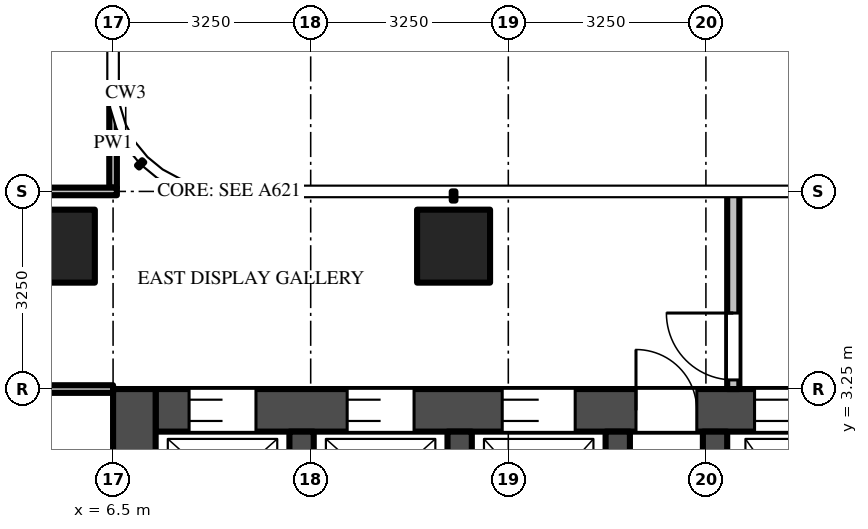
"""IFC4 building model, lengths in metres.
Left out: names, types, materials, properties, quantities, classifications, styles, units other than length and angle.
Written with IfcOpenShell. Run it as: python <this file> out.ifc"""

import sys

from ifc_helpers import new_model, si_unit, direction, frame, frame_2d, origin, origin_2d, place, context, subcontext, project, spatial, rectangle, extrude, source, transform, mapped, element, fill, save


model = new_model("IFC4")
c1 = context("Model", 3, precision=1e-05, world=origin(), true_north=direction((0.0, 1.0)))
c2 = subcontext(c1, "Body", "Model", "MODEL_VIEW")
j1 = project(units=[si_unit("LENGTHUNIT", "METRE"), si_unit("PLANEANGLEUNIT", "RADIAN")], contexts=[c1])
p1 = place(None, origin())
s1 = spatial("IfcSite", under=j1, at=p1, CompositionType="ELEMENT")
p2 = place(p1, origin())
s2 = spatial("IfcBuilding", under=s1, at=p2, CompositionType="ELEMENT")
p3 = place(p2, frame((0.0, 0.0, 181.5)))
s3 = spatial("IfcBuildingStorey", under=s2, at=p3, CompositionType="ELEMENT", Elevation=181.5)
m1 = source(origin(), c2, "Body", "SweptSolid", [
    extrude(rectangle(XDim=1.2, YDim=1.2, at=origin_2d()), origin(), (0.0, 0.0, 1.0), 3.9),
])
for number, where, z_axis, x_axis in (
    (1, (12.1, 5.6, 0.0), (0.0, 0.0, 1.0), (1.0, 0.0, 0.0)),
    (2, (5.6, 5.6, 0.0), (0.0, 0.0, 1.0), (1.0, 0.0, 0.0)),
):
    element("IfcColumn", number, at=place(p3, frame(where, z_axis=z_axis, x_axis=x_axis)), inside=s3, PredefinedType="COLUMN", context=c2, shape_type="MappedRepresentation", body=[
        mapped(m1, transform((0.0, 0.0, 0.0))),
    ])
m2 = source(origin(), c2, "Body", "SweptSolid", [
    extrude(rectangle(XDim=14.85, YDim=0.7, at=frame_2d((7.425, 0.0))), origin(), (0.0, 0.0, 1.0), 3.7),
])
p4 = place(p3, frame((7.2, 2.9, 0.0), z_axis=(0.0, 0.0, 1.0), x_axis=(1.0, 0.0, 0.0)))
e3 = element("IfcWall", 3, at=p4, inside=s3, PredefinedType="SHEAR", context=c2, shape_type="MappedRepresentation", body=[
    mapped(m2, transform((0.0, 0.0, 0.0))),
])
m3 = source(origin(), c2, "Body", "SweptSolid", [
    extrude(rectangle(XDim=1.1, YDim=2.1, at=frame_2d((0.55, 1.05))), frame((0.0, 0.36, 0.0), z_axis=(0.0, -1.0, 0.0), x_axis=(1.0, 0.0, 0.0)), (0.0, 0.0, 1.0), 0.72),
])
p5 = place(p4, frame((0.55, 0.0, 0.0)))
e4 = element("IfcOpeningElement", 4, at=p5, cuts=e3, PredefinedType="OPENING", context=c2, shape_type="MappedRepresentation", body=[
    mapped(m3, transform((0.0, 0.0, 0.0))),
])
p6 = place(p4, frame((3.15, 0.0, 0.0)))
e5 = element("IfcOpeningElement", 5, at=p6, cuts=e3, PredefinedType="OPENING", context=c2, shape_type="MappedRepresentation", body=[
    mapped(m3, transform((0.0, 0.0, 0.0))),
])
m4 = source(origin(), c2, "Body", "SweptSolid", [
    extrude(rectangle(XDim=1.2, YDim=2.1, at=frame_2d((0.6, 1.05))), frame((0.0, 0.36, 0.0), z_axis=(0.0, -1.0, 0.0), x_axis=(1.0, 0.0, 0.0)), (0.0, 0.0, 1.0), 0.72),
])
p7 = place(p4, frame((5.7, 0.0, 0.0)))
e6 = element("IfcOpeningElement", 6, at=p7, cuts=e3, PredefinedType="OPENING", context=c2, shape_type="MappedRepresentation", body=[
    mapped(m4, transform((0.0, 0.0, 0.0))),
])
m5 = source(origin(), c2, "Body", "SweptSolid", [
    extrude(rectangle(XDim=1.3, YDim=2.1, at=frame_2d((0.65, 1.05))), frame((0.0, 0.36, 0.0), z_axis=(0.0, -1.0, 0.0), x_axis=(1.0, 0.0, 0.0)), (0.0, 0.0, 1.0), 0.72),
])
p8 = place(p4, frame((12.2, 0.0, 0.0)))
e7 = element("IfcOpeningElement", 7, at=p8, cuts=e3, PredefinedType="OPENING", context=c2, shape_type="MappedRepresentation", body=[
    mapped(m5, transform((0.0, 0.0, 0.0))),
])
p9 = place(p4, frame((9.85, 0.0, 0.0)))
e8 = element("IfcOpeningElement", 8, at=p9, cuts=e3, PredefinedType="OPENING", context=c2, shape_type="MappedRepresentation", body=[
    mapped(m4, transform((0.0, 0.0, 0.0))),
])
m6 = source(origin(), c2, "Body", "SweptSolid", [
    extrude(rectangle(XDim=1.0, YDim=2.1, at=frame_2d((0.5, 1.05))), frame((0.0, 0.36, 0.0), z_axis=(0.0, -1.0, 0.0), x_axis=(1.0, 0.0, 0.0)), (0.0, 0.0, 1.0), 0.72),
])
p10 = place(p4, frame((7.9, 0.0, 0.0)))
e9 = element("IfcOpeningElement", 9, at=p10, cuts=e3, PredefinedType="OPENING", context=c2, shape_type="MappedRepresentation", body=[
    mapped(m6, transform((0.0, 0.0, 0.0))),
])
m7 = source(origin(), c2, "Body", "SweptSolid", [
    extrude(rectangle(XDim=9.05, YDim=0.7, at=frame_2d((4.525, 0.0))), origin(), (0.0, 0.0, 1.0), 3.7),
])
p11 = place(p3, frame((6.85, -5.8, 0.0), z_axis=(0.0, 0.0, 1.0), x_axis=(0.0, 1.0, 0.0)))
e10 = element("IfcWall", 10, at=p11, inside=s3, PredefinedType="SHEAR", context=c2, shape_type="MappedRepresentation", body=[
    mapped(m7, transform((0.0, 0.0, 0.0))),
])
m8 = source(origin(), c2, "Body", "SweptSolid", [
    extrude(rectangle(XDim=1.8, YDim=2.1, at=frame_2d((0.9, 1.05))), frame((0.0, 0.36, 0.0), z_axis=(0.0, -1.0, 0.0), x_axis=(1.0, 0.0, 0.0)), (0.0, 0.0, 1.0), 0.72),
])
p12 = place(p11, frame((3.15, 0.0, 0.0)))
e11 = element("IfcOpeningElement", 11, at=p12, cuts=e10, PredefinedType="OPENING", context=c2, shape_type="MappedRepresentation", body=[
    mapped(m8, transform((0.0, 0.0, 0.0))),
])
m9 = source(origin(), c2, "Body", "SweptSolid", [
    extrude(rectangle(XDim=2.45, YDim=0.4, at=frame_2d((1.225, 0.0))), origin(), (0.0, 0.0, 1.0), 3.7),
])
for number, where, z_axis, x_axis in (
    (12, (9.6, 0.1, 0.0), (0.0, 0.0, 1.0), (0.0, 1.0, 0.0)),
    (13, (12.2, 0.1, 0.0), (0.0, 0.0, 1.0), (0.0, 1.0, 0.0)),
    (14, (14.8, 0.1, 0.0), (0.0, 0.0, 1.0), (0.0, 1.0, 0.0)),
    (15, (16.4, 0.1, 0.0), (0.0, 0.0, 1.0), (0.0, 1.0, 0.0)),
):
    element("IfcWall", number, at=place(p3, frame(where, z_axis=z_axis, x_axis=x_axis)), inside=s3, PredefinedType="SHEAR", context=c2, shape_type="MappedRepresentation", body=[
        mapped(m9, transform((0.0, 0.0, 0.0))),
    ])
m10 = source(origin(), c2, "Body", "SweptSolid", [
    extrude(rectangle(XDim=3.25, YDim=0.2, at=frame_2d((1.625, 0.0))), origin(), (0.0, 0.0, 1.0), 3.7),
])
p13 = place(p3, frame((16.7, 3.25, 0.0), z_axis=(0.0, 0.0, 1.0), x_axis=(0.0, 1.0, 0.0)))
e16 = element("IfcWall", 16, at=p13, inside=s3, PredefinedType="PARTITIONING", context=c2, shape_type="MappedRepresentation", body=[
    mapped(m10, transform((0.0, 0.0, 0.0))),
])
m11 = source(origin(), c2, "Body", "SweptSolid", [
    extrude(rectangle(XDim=1.1, YDim=2.1, at=frame_2d((0.55, 1.05))), frame((0.0, 0.11, 0.0), z_axis=(0.0, -1.0, 0.0), x_axis=(1.0, 0.0, 0.0)), (0.0, 0.0, 1.0), 0.22),
])
p14 = place(p13, frame((0.15, 0.0, 0.0)))
e17 = element("IfcOpeningElement", 17, at=p14, cuts=e16, PredefinedType="OPENING", context=c2, shape_type="MappedRepresentation", body=[
    mapped(m11, transform((0.0, 0.0, 0.0))),
])
m12 = source(origin(), c2, "Body", "SweptSolid", [
    extrude(rectangle(XDim=1.469, YDim=0.125, at=frame_2d((0.734, 0.0))), origin(), (0.0, 0.0, 1.0), 3.7),
])
p15 = place(p3, frame((6.5, 6.562, 0.0), z_axis=(0.0, 0.0, 1.0), x_axis=(0.0, 1.0, 0.0)))
e18 = element("IfcWall", 18, at=p15, inside=s3, PredefinedType="PARTITIONING", context=c2, shape_type="MappedRepresentation", body=[
    mapped(m12, transform((0.0, 0.0, 0.0))),
])
m13 = source(origin(), c2, "Body", "SweptSolid", [
    extrude(rectangle(XDim=5.363, YDim=0.125, at=frame_2d((2.681, 0.0))), origin(), (0.0, 0.0, 1.0), 2.997),
])
p16 = place(p3, frame((1.137, 3.25, 0.0), z_axis=(0.0, 0.0, 1.0), x_axis=(1.0, 0.0, 0.0)))
e19 = element("IfcWall", 19, at=p16, inside=s3, PredefinedType="PARTITIONING", context=c2, shape_type="MappedRepresentation", body=[
    mapped(m13, transform((0.0, 0.0, 0.0))),
])
m14 = source(origin(), c2, "Body", "SweptSolid", [
    extrude(rectangle(XDim=5.425, YDim=0.125, at=frame_2d((2.712, 0.0))), origin(), (0.0, 0.0, 1.0), 2.78),
])
p17 = place(p3, frame((1.137, 6.5, 0.0), z_axis=(0.0, 0.0, 1.0), x_axis=(1.0, 0.0, 0.0)))
e20 = element("IfcWall", 20, at=p17, inside=s3, PredefinedType="PARTITIONING", context=c2, shape_type="MappedRepresentation", body=[
    mapped(m14, transform((0.0, 0.0, 0.0))),
])
m15 = source(origin(), c2, "Body", "SweptSolid", [
    extrude(rectangle(XDim=1.0, YDim=2.1, at=frame_2d((0.5, 1.05))), frame((0.0, 0.073, 0.0), z_axis=(0.0, -1.0, 0.0), x_axis=(1.0, 0.0, 0.0)), (0.0, 0.0, 1.0), 0.145),
])
p18 = place(p17, frame((0.413, 0.0, 0.0)))
e21 = element("IfcOpeningElement", 21, at=p18, cuts=e20, PredefinedType="OPENING", context=c2, shape_type="MappedRepresentation", body=[
    mapped(m15, transform((0.0, 0.0, 0.0))),
])
m16 = source(origin(), c2, "Body", "SweptSolid", [
    extrude(rectangle(XDim=1.1, YDim=2.1, at=frame_2d((0.55, 1.05))), frame((0.0, -0.275, 0.0), z_axis=(0.0, -1.0, 0.0), x_axis=(1.0, 0.0, 0.0)), (0.0, 0.0, 1.0), 0.05),
])
p19 = place(p5, origin())
e22 = element("IfcDoor", 22, at=p19, inside=s3, OperationType="DOUBLE_DOOR_SLIDING", PredefinedType="DOOR", context=c2, shape_type="MappedRepresentation", body=[
    mapped(m16, transform((0.0, 0.0, 0.0))),
])
fill(e4, e22)
p20 = place(p6, origin())
e23 = element("IfcDoor", 23, at=p20, inside=s3, OperationType="DOUBLE_DOOR_SLIDING", PredefinedType="DOOR", context=c2, shape_type="MappedRepresentation", body=[
    mapped(m16, transform((0.0, 0.0, 0.0))),
])
fill(e5, e23)
m17 = source(origin(), c2, "Body", "SweptSolid", [
    extrude(rectangle(XDim=1.2, YDim=2.1, at=frame_2d((0.6, 1.05))), frame((0.0, -0.275, 0.0), z_axis=(0.0, -1.0, 0.0), x_axis=(1.0, 0.0, 0.0)), (0.0, 0.0, 1.0), 0.05),
])
p21 = place(p7, origin())
e24 = element("IfcDoor", 24, at=p21, inside=s3, OperationType="DOUBLE_DOOR_SLIDING", PredefinedType="DOOR", context=c2, shape_type="MappedRepresentation", body=[
    mapped(m17, transform((0.0, 0.0, 0.0))),
])
fill(e6, e24)
p22 = place(p9, origin())
e25 = element("IfcDoor", 25, at=p22, inside=s3, OperationType="DOUBLE_DOOR_SLIDING", PredefinedType="DOOR", context=c2, shape_type="MappedRepresentation", body=[
    mapped(m17, transform((0.0, 0.0, 0.0))),
])
fill(e8, e25)
m18 = source(origin(), c2, "Body", "SweptSolid", [
    extrude(rectangle(XDim=1.0, YDim=2.1, at=frame_2d((0.5, 1.05))), frame((0.0, -0.275, 0.0), z_axis=(0.0, -1.0, 0.0), x_axis=(1.0, 0.0, 0.0)), (0.0, 0.0, 1.0), 0.05),
])
p23 = place(p10, origin())
e26 = element("IfcDoor", 26, at=p23, inside=s3, OperationType="SINGLE_SWING_LEFT", PredefinedType="DOOR", context=c2, shape_type="MappedRepresentation", body=[
    mapped(m18, transform((0.0, 0.0, 0.0))),
])
fill(e9, e26)
m19 = source(origin(), c2, "Body", "SweptSolid", [
    extrude(rectangle(XDim=1.1, YDim=2.1, at=frame_2d((0.55, 1.05))), frame((0.0, 0.025, 0.0), z_axis=(0.0, -1.0, 0.0), x_axis=(1.0, 0.0, 0.0)), (0.0, 0.0, 1.0), 0.05),
])
p24 = place(p14, origin())
e27 = element("IfcDoor", 27, at=p24, inside=s3, OperationType="SINGLE_SWING_RIGHT", PredefinedType="DOOR", context=c2, shape_type="MappedRepresentation", body=[
    mapped(m19, transform((0.0, 0.0, 0.0))),
])
fill(e17, e27)
save(model, sys.argv[1])
